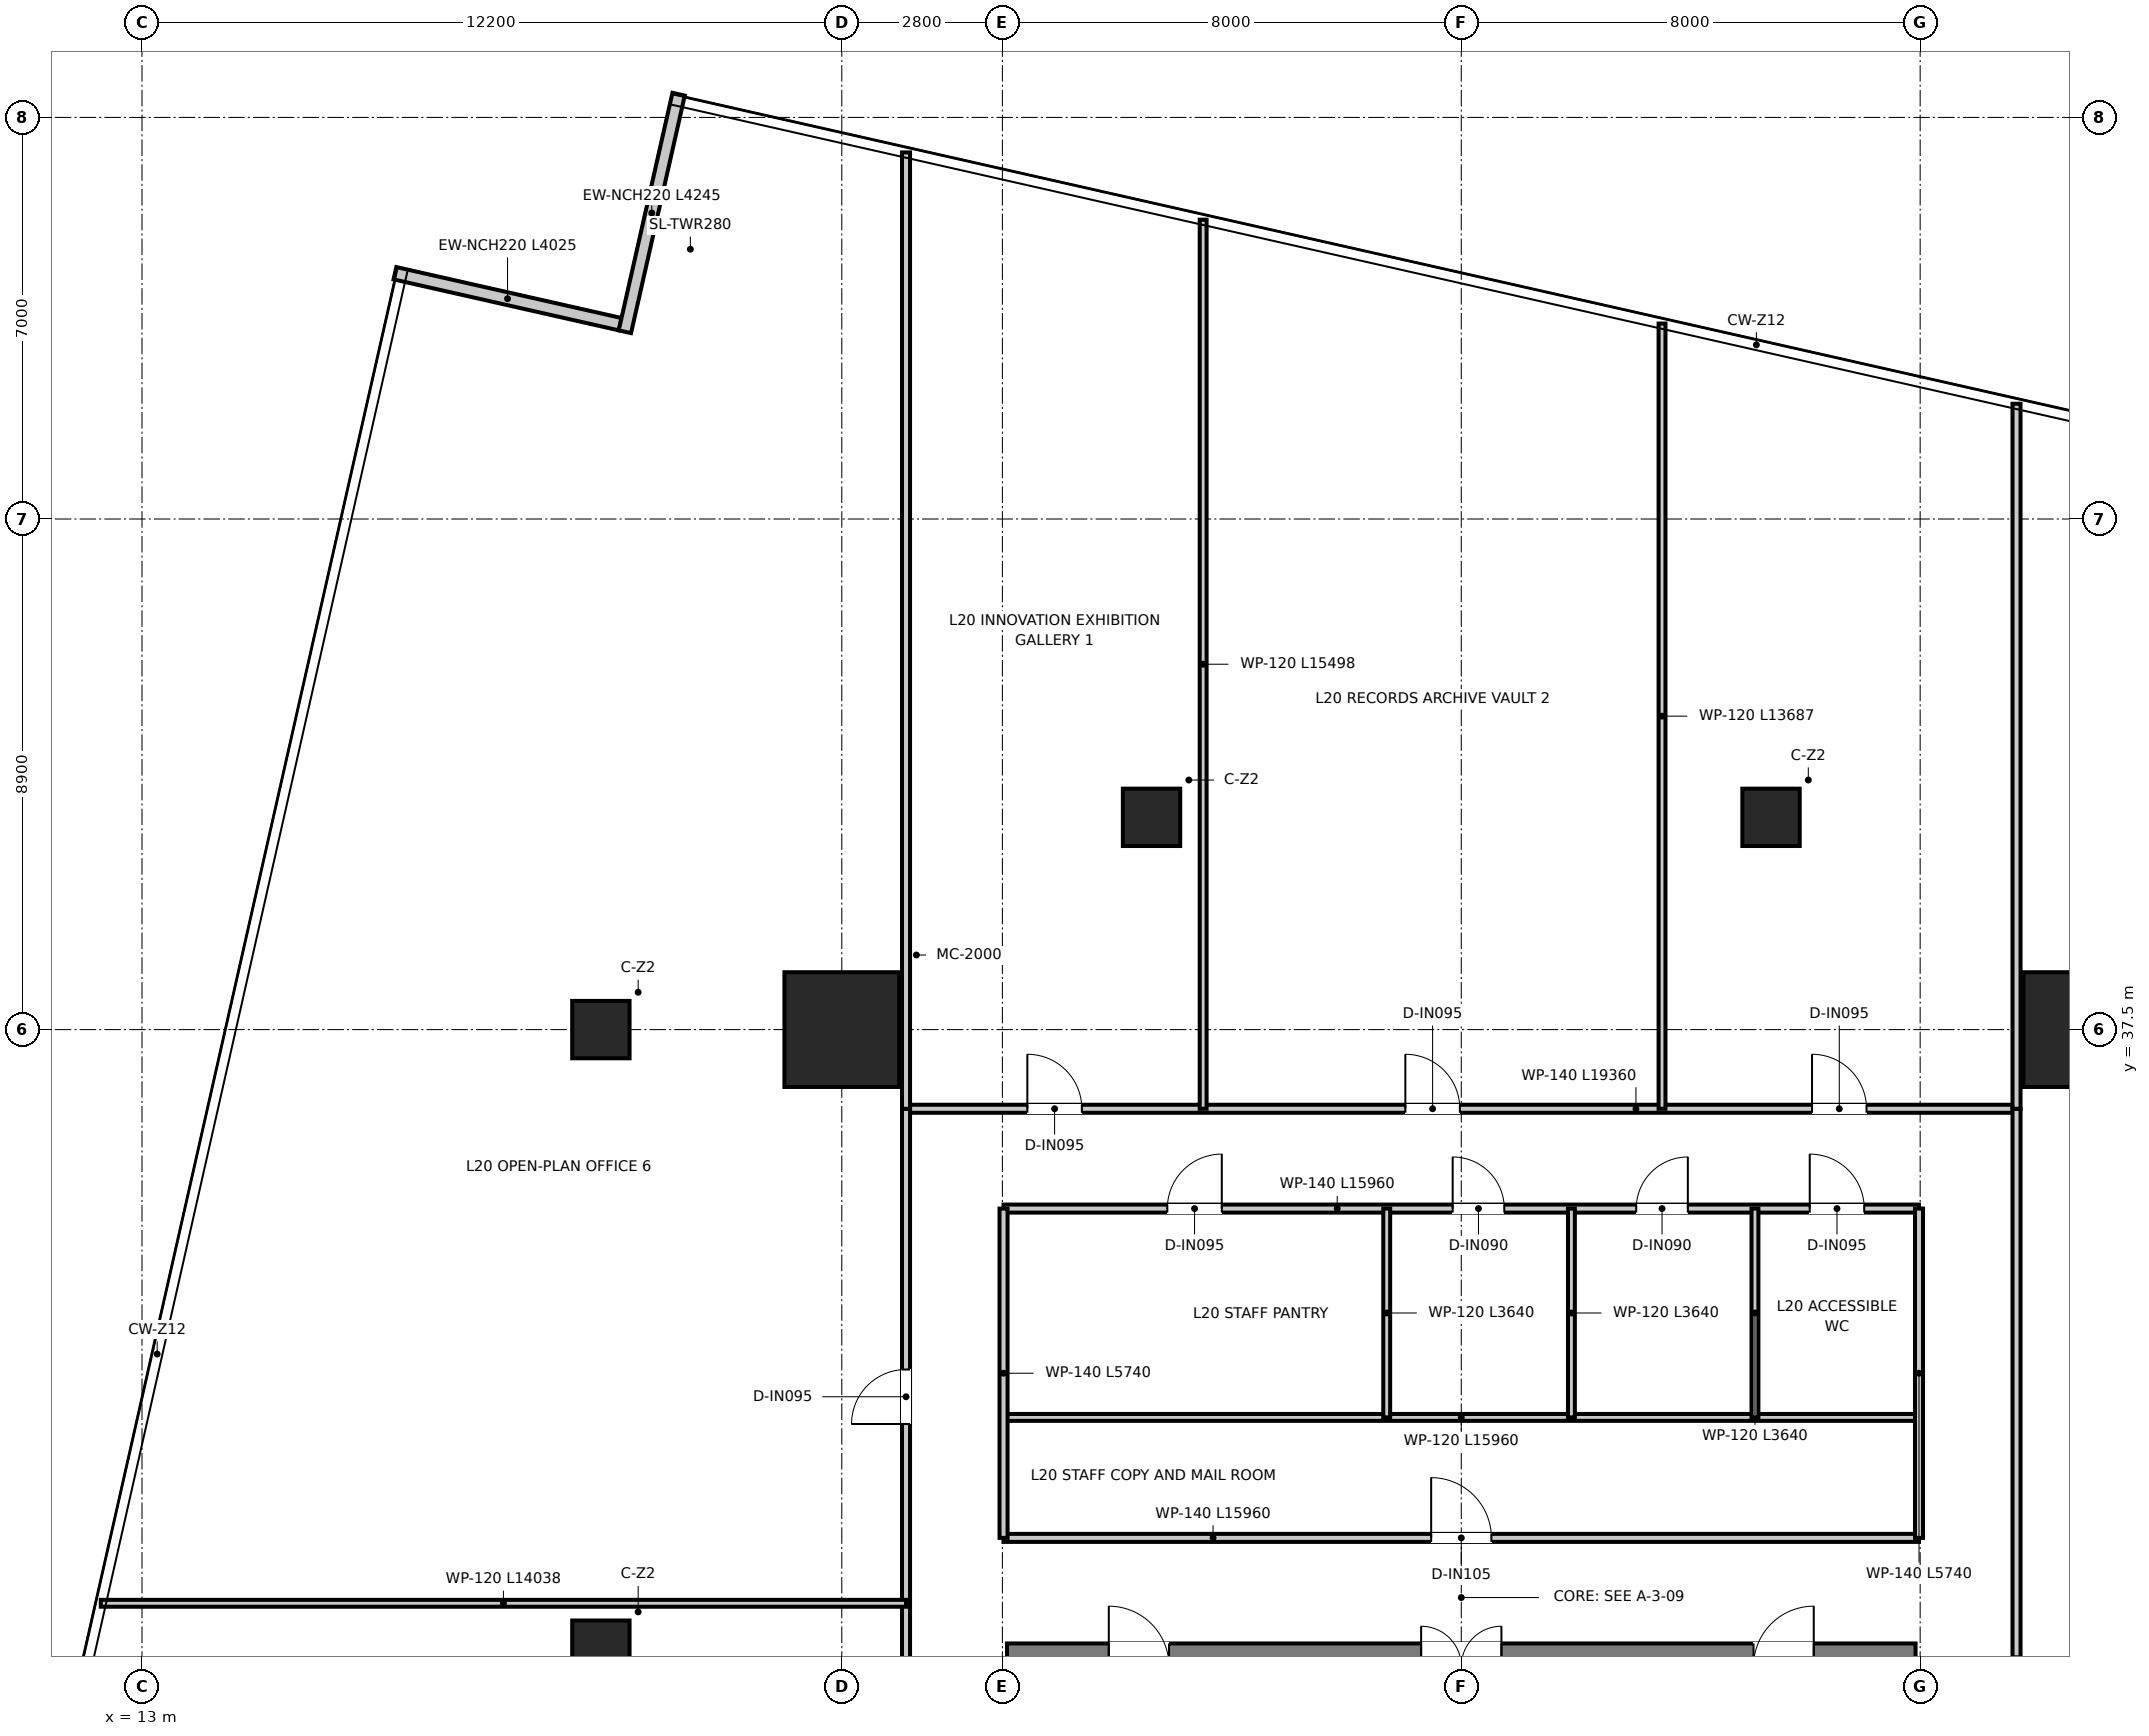
"""IFC4 building model, lengths in metres.
Left out: names, types, materials, properties, quantities, classifications, styles, units other than length and angle.
Written with IfcOpenShell. Run it as: python <this file> out.ifc"""

import sys

from ifc_helpers import new_model, si_unit, direction, frame, frame_2d, origin, origin_2d, place, context, subcontext, project, spatial, rectangle, extrude, source, transform, mapped, element, fill, save


model = new_model("IFC4")
c1 = context("Model", 3, precision=1e-05, world=origin(), true_north=direction((0.0, 1.0)))
c2 = subcontext(c1, "Body", "Model", "MODEL_VIEW")
j1 = project(units=[si_unit("LENGTHUNIT", "METRE"), si_unit("PLANEANGLEUNIT", "RADIAN")], contexts=[c1])
p1 = place(None, origin())
s1 = spatial("IfcSite", under=j1, at=p1, CompositionType="ELEMENT")
p2 = place(p1, origin())
s2 = spatial("IfcBuilding", under=s1, at=p2, CompositionType="ELEMENT")
p3 = place(p2, frame((0.0, 0.0, 86.1)))
s3 = spatial("IfcBuildingStorey", under=s2, at=p3, CompositionType="ELEMENT", Elevation=86.1)
p4 = place(p3, frame((28.08, 26.4, 0.0), z_axis=(0.0, 0.0, 1.0), x_axis=(1.0, 0.0, 0.0)))
e1 = element("IfcWall", 1, at=p4, inside=s3, PredefinedType="SHEAR", context=c2, shape_type="SweptSolid", body=[
    extrude(rectangle(XDim=15.84, YDim=0.8, at=frame_2d((7.92, 0.0))), origin(), (0.0, 0.0, 1.0), 3.95),
])
p5 = place(p4, frame((7.22, 0.0, 0.0)))
e2 = element("IfcOpeningElement", 2, at=p5, cuts=e1, PredefinedType="OPENING", context=c2, shape_type="SweptSolid", body=[
    extrude(rectangle(XDim=1.4, YDim=2.2, at=frame_2d((0.7, 1.1))), frame((0.0, 0.41, 0.0), z_axis=(0.0, -1.0, 0.0), x_axis=(1.0, 0.0, 0.0)), (0.0, 0.0, 1.0), 0.82),
])
p6 = place(p4, frame((1.775, 0.0, 0.0)))
e3 = element("IfcOpeningElement", 3, at=p6, cuts=e1, PredefinedType="OPENING", context=c2, shape_type="SweptSolid", body=[
    extrude(rectangle(XDim=1.05, YDim=2.1, at=frame_2d((0.525, 1.05))), frame((0.0, 0.41, 0.0), z_axis=(0.0, -1.0, 0.0), x_axis=(1.0, 0.0, 0.0)), (0.0, 0.0, 1.0), 0.82),
])
p7 = place(p4, frame((13.015, 0.0, 0.0)))
e4 = element("IfcOpeningElement", 4, at=p7, cuts=e1, PredefinedType="OPENING", context=c2, shape_type="SweptSolid", body=[
    extrude(rectangle(XDim=1.05, YDim=2.1, at=frame_2d((0.525, 1.05))), frame((0.0, 0.41, 0.0), z_axis=(0.0, -1.0, 0.0), x_axis=(1.0, 0.0, 0.0)), (0.0, 0.0, 1.0), 0.82),
])
m1 = source(origin(), c2, "Body", "SweptSolid", [
    extrude(rectangle(XDim=2.0, YDim=2.0, at=origin_2d()), origin(), (0.0, 0.0, 1.0), 3.95),
])
for number, where, z_axis, x_axis in (
    (5, (46.8, 37.5, 0.0), (0.0, 0.0, 1.0), (1.0, 0.0, 0.0)),
    (6, (25.2, 37.5, 0.0), (0.0, 0.0, 1.0), (1.0, 0.0, 0.0)),
):
    element("IfcColumn", number, at=place(p3, frame(where, z_axis=z_axis, x_axis=x_axis)), inside=s3, PredefinedType="USERDEFINED", context=c2, shape_type="MappedRepresentation", body=[
        mapped(m1, transform((0.0, 0.0, 0.0), x_axis=(1.0, 0.0, 0.0), y_axis=(0.0, 1.0, 0.0), z_axis=(0.0, 0.0, 1.0), scale=1.0)),
    ])
m2 = source(origin(), c2, "Body", "SweptSolid", [
    extrude(rectangle(XDim=1.0, YDim=1.0, at=origin_2d()), origin(), (0.0, 0.0, 1.0), 3.95),
])
for number, where, z_axis, x_axis in (
    (7, (21.0, 26.7, 0.0), (0.0, 0.0, 1.0), (1.0, 0.0, 0.0)),
    (8, (21.0, 37.5, 0.0), (0.0, 0.0, 1.0), (1.0, 0.0, 0.0)),
    (9, (30.6, 41.2, 0.0), (0.0, 0.0, 1.0), (1.0, 0.0, 0.0)),
    (10, (41.4, 41.2, 0.0), (0.0, 0.0, 1.0), (1.0, 0.0, 0.0)),
):
    element("IfcColumn", number, at=place(p3, frame(where, z_axis=z_axis, x_axis=x_axis)), inside=s3, PredefinedType="COLUMN", context=c2, shape_type="MappedRepresentation", body=[
        mapped(m2, transform((0.0, 0.0, 0.0), x_axis=(1.0, 0.0, 0.0), y_axis=(0.0, 1.0, 0.0), z_axis=(0.0, 0.0, 1.0), scale=1.0)),
    ])
p8 = place(p3, frame((21.336, 49.796, 0.0), z_axis=(0.0, 0.0, 1.0), x_axis=(-0.975349272951, 0.2206667074, 0.0)))
e11 = element("IfcWall", 11, at=p8, inside=s3, PredefinedType="ELEMENTEDWALL", context=c2, shape_type="SweptSolid", body=[
    extrude(rectangle(XDim=4.025, YDim=0.22, at=frame_2d((2.012, 0.0))), origin(), (0.0, 0.0, 1.0), 3.67),
])
p9 = place(p3, frame((22.355, 53.805, 0.0), z_axis=(0.0, 0.0, 1.0), x_axis=(-0.220673913812, -0.975347642517, 0.0)))
e12 = element("IfcWall", 12, at=p9, inside=s3, PredefinedType="ELEMENTEDWALL", context=c2, shape_type="SweptSolid", body=[
    extrude(rectangle(XDim=4.245, YDim=0.22, at=frame_2d((2.123, 0.0))), origin(), (0.0, 0.0, 1.0), 3.67),
])
p10 = place(p3, frame((28.02, 28.64, 0.0), z_axis=(0.0, 0.0, 1.0), x_axis=(1.0, 0.0, 0.0)))
e13 = element("IfcWall", 13, at=p10, inside=s3, PredefinedType="PARTITIONING", context=c2, shape_type="SweptSolid", body=[
    extrude(rectangle(XDim=15.96, YDim=0.14, at=frame_2d((7.98, 0.0))), origin(), (0.0, 0.0, 1.0), 3.08),
])
p11 = place(p10, frame((7.455, 0.0, 0.0)))
e14 = element("IfcOpeningElement", 14, at=p11, cuts=e13, PredefinedType="OPENING", context=c2, shape_type="SweptSolid", body=[
    extrude(rectangle(XDim=1.05, YDim=2.15, at=frame_2d((0.525, 1.075))), frame((0.0, 0.08, 0.0), z_axis=(0.0, -1.0, 0.0), x_axis=(1.0, 0.0, 0.0)), (0.0, 0.0, 1.0), 0.16),
])
p12 = place(p3, frame((28.02, 30.74, 0.0), z_axis=(0.0, 0.0, 1.0), x_axis=(1.0, 0.0, 0.0)))
e15 = element("IfcWall", 15, at=p12, inside=s3, PredefinedType="PARTITIONING", context=c2, shape_type="SweptSolid", body=[
    extrude(rectangle(XDim=15.96, YDim=0.12, at=frame_2d((7.98, 0.0))), origin(), (0.0, 0.0, 1.0), 3.08),
])
p13 = place(p3, frame((28.02, 34.38, 0.0), z_axis=(0.0, 0.0, 1.0), x_axis=(1.0, 0.0, 0.0)))
e16 = element("IfcWall", 16, at=p13, inside=s3, PredefinedType="PARTITIONING", context=c2, shape_type="SweptSolid", body=[
    extrude(rectangle(XDim=15.96, YDim=0.14, at=frame_2d((7.98, 0.0))), origin(), (0.0, 0.0, 1.0), 3.08),
])
p14 = place(p13, frame((7.83, 0.0, 0.0)))
e17 = element("IfcOpeningElement", 17, at=p14, cuts=e16, PredefinedType="OPENING", context=c2, shape_type="SweptSolid", body=[
    extrude(rectangle(XDim=0.9, YDim=2.1, at=frame_2d((0.45, 1.05))), frame((0.0, 0.08, 0.0), z_axis=(0.0, -1.0, 0.0), x_axis=(1.0, 0.0, 0.0)), (0.0, 0.0, 1.0), 0.16),
])
p15 = place(p13, frame((11.03, 0.0, 0.0)))
e18 = element("IfcOpeningElement", 18, at=p15, cuts=e16, PredefinedType="OPENING", context=c2, shape_type="SweptSolid", body=[
    extrude(rectangle(XDim=0.9, YDim=2.1, at=frame_2d((0.45, 1.05))), frame((0.0, 0.08, 0.0), z_axis=(0.0, -1.0, 0.0), x_axis=(1.0, 0.0, 0.0)), (0.0, 0.0, 1.0), 0.16),
])
p16 = place(p13, frame((14.055, 0.0, 0.0)))
e19 = element("IfcOpeningElement", 19, at=p16, cuts=e16, PredefinedType="OPENING", context=c2, shape_type="SweptSolid", body=[
    extrude(rectangle(XDim=0.95, YDim=2.1, at=frame_2d((0.475, 1.05))), frame((0.0, 0.08, 0.0), z_axis=(0.0, -1.0, 0.0), x_axis=(1.0, 0.0, 0.0)), (0.0, 0.0, 1.0), 0.16),
])
p17 = place(p13, frame((2.855, 0.0, 0.0)))
e20 = element("IfcOpeningElement", 20, at=p17, cuts=e16, PredefinedType="OPENING", context=c2, shape_type="SweptSolid", body=[
    extrude(rectangle(XDim=0.95, YDim=2.1, at=frame_2d((0.475, 1.05))), frame((0.0, 0.08, 0.0), z_axis=(0.0, -1.0, 0.0), x_axis=(1.0, 0.0, 0.0)), (0.0, 0.0, 1.0), 0.16),
])
for number, where, z_axis, x_axis in (
    (21, (28.02, 28.64, 0.0), (0.0, 0.0, 1.0), (0.0, 1.0, 0.0)),
    (22, (43.98, 28.64, 0.0), (0.0, 0.0, 1.0), (0.0, 1.0, 0.0)),
):
    element("IfcWall", number, at=place(p3, frame(where, z_axis=z_axis, x_axis=x_axis)), inside=s3, PredefinedType="PARTITIONING", context=c2, shape_type="SweptSolid", body=[
        extrude(rectangle(XDim=5.74, YDim=0.14, at=frame_2d((2.87, 0.0))), origin(), (0.0, 0.0, 1.0), 3.27),
    ])
for number, where, z_axis, x_axis in (
    (23, (37.92, 30.74, 0.0), (0.0, 0.0, 1.0), (0.0, 1.0, 0.0)),
    (24, (41.12, 30.74, 0.0), (0.0, 0.0, 1.0), (0.0, 1.0, 0.0)),
    (25, (34.7, 30.74, 0.0), (0.0, 0.0, 1.0), (0.0, 1.0, 0.0)),
):
    element("IfcWall", number, at=place(p3, frame(where, z_axis=z_axis, x_axis=x_axis)), inside=s3, PredefinedType="PARTITIONING", context=c2, shape_type="SweptSolid", body=[
        extrude(rectangle(XDim=3.64, YDim=0.12, at=frame_2d((1.82, 0.0))), origin(), (0.0, 0.0, 1.0), 3.17),
    ])
p18 = place(p3, frame((26.32, 36.12, 0.0), z_axis=(0.0, 0.0, 1.0), x_axis=(1.0, 0.0, 0.0)))
e26 = element("IfcWall", 26, at=p18, inside=s3, PredefinedType="PARTITIONING", context=c2, shape_type="SweptSolid", body=[
    extrude(rectangle(XDim=19.36, YDim=0.14, at=frame_2d((9.68, 0.0))), origin(), (0.0, 0.0, 1.0), 3.08),
])
p19 = place(p18, frame((2.115, 0.0, 0.0)))
e27 = element("IfcOpeningElement", 27, at=p19, cuts=e26, PredefinedType="OPENING", context=c2, shape_type="SweptSolid", body=[
    extrude(rectangle(XDim=0.95, YDim=2.1, at=frame_2d((0.475, 1.05))), frame((0.0, 0.08, 0.0), z_axis=(0.0, -1.0, 0.0), x_axis=(1.0, 0.0, 0.0)), (0.0, 0.0, 1.0), 0.16),
])
p20 = place(p18, frame((8.705, 0.0, 0.0)))
e28 = element("IfcOpeningElement", 28, at=p20, cuts=e26, PredefinedType="OPENING", context=c2, shape_type="SweptSolid", body=[
    extrude(rectangle(XDim=0.95, YDim=2.1, at=frame_2d((0.475, 1.05))), frame((0.0, 0.08, 0.0), z_axis=(0.0, -1.0, 0.0), x_axis=(1.0, 0.0, 0.0)), (0.0, 0.0, 1.0), 0.16),
])
p21 = place(p18, frame((15.795, 0.0, 0.0)))
e29 = element("IfcOpeningElement", 29, at=p21, cuts=e26, PredefinedType="OPENING", context=c2, shape_type="SweptSolid", body=[
    extrude(rectangle(XDim=0.95, YDim=2.1, at=frame_2d((0.475, 1.05))), frame((0.0, 0.08, 0.0), z_axis=(0.0, -1.0, 0.0), x_axis=(1.0, 0.0, 0.0)), (0.0, 0.0, 1.0), 0.16),
])
p22 = place(p3, frame((26.32, 10.5, 0.0), z_axis=(0.0, 0.0, 1.0), x_axis=(0.0, 1.0, 0.0)))
e30 = element("IfcWall", 30, at=p22, inside=s3, PredefinedType="PARTITIONING", context=c2, shape_type="SweptSolid", body=[
    extrude(rectangle(XDim=25.62, YDim=0.14, at=frame_2d((12.81, 0.0))), origin(), (0.0, 0.0, 1.0), 2.97),
])
p23 = place(p22, frame((8.025, 0.0, 0.0)))
e31 = element("IfcOpeningElement", 31, at=p23, cuts=e30, PredefinedType="OPENING", context=c2, shape_type="SweptSolid", body=[
    extrude(rectangle(XDim=0.95, YDim=2.1, at=frame_2d((0.475, 1.05))), frame((0.0, 0.08, 0.0), z_axis=(0.0, -1.0, 0.0), x_axis=(1.0, 0.0, 0.0)), (0.0, 0.0, 1.0), 0.16),
])
p24 = place(p22, frame((13.025, 0.0, 0.0)))
e32 = element("IfcOpeningElement", 32, at=p24, cuts=e30, PredefinedType="OPENING", context=c2, shape_type="SweptSolid", body=[
    extrude(rectangle(XDim=0.95, YDim=2.1, at=frame_2d((0.475, 1.05))), frame((0.0, 0.08, 0.0), z_axis=(0.0, -1.0, 0.0), x_axis=(1.0, 0.0, 0.0)), (0.0, 0.0, 1.0), 0.16),
])
p25 = place(p22, frame((20.125, 0.0, 0.0)))
e33 = element("IfcOpeningElement", 33, at=p25, cuts=e30, PredefinedType="OPENING", context=c2, shape_type="SweptSolid", body=[
    extrude(rectangle(XDim=0.95, YDim=2.1, at=frame_2d((0.475, 1.05))), frame((0.0, 0.08, 0.0), z_axis=(0.0, -1.0, 0.0), x_axis=(1.0, 0.0, 0.0)), (0.0, 0.0, 1.0), 0.16),
])
p26 = place(p3, frame((45.68, 10.5, 0.0), z_axis=(0.0, 0.0, 1.0), x_axis=(0.0, 1.0, 0.0)))
e34 = element("IfcWall", 34, at=p26, inside=s3, PredefinedType="PARTITIONING", context=c2, shape_type="SweptSolid", body=[
    extrude(rectangle(XDim=25.62, YDim=0.14, at=frame_2d((12.81, 0.0))), origin(), (0.0, 0.0, 1.0), 2.97),
])
p27 = place(p26, frame((15.125, 0.0, 0.0)))
e35 = element("IfcOpeningElement", 35, at=p27, cuts=e34, PredefinedType="OPENING", context=c2, shape_type="SweptSolid", body=[
    extrude(rectangle(XDim=0.95, YDim=2.1, at=frame_2d((0.475, 1.05))), frame((0.0, 0.08, 0.0), z_axis=(0.0, -1.0, 0.0), x_axis=(1.0, 0.0, 0.0)), (0.0, 0.0, 1.0), 0.16),
])
p28 = place(p3, frame((26.32, 36.12, 0.0), z_axis=(0.0, 0.0, 1.0), x_axis=(0.0, 1.0, 0.0)))
e36 = element("IfcWall", 36, at=p28, inside=s3, PredefinedType="PARTITIONING", context=c2, shape_type="SweptSolid", body=[
    extrude(rectangle(XDim=16.67, YDim=0.14, at=frame_2d((8.335, 0.0))), origin(), (0.0, 0.0, 1.0), 2.97),
])
p29 = place(p3, frame((45.68, 36.12, 0.0), z_axis=(0.0, 0.0, 1.0), x_axis=(0.0, 1.0, 0.0)))
e37 = element("IfcWall", 37, at=p29, inside=s3, PredefinedType="PARTITIONING", context=c2, shape_type="SweptSolid", body=[
    extrude(rectangle(XDim=12.289, YDim=0.14, at=frame_2d((6.145, 0.0))), origin(), (0.0, 0.0, 1.0), 2.97),
])
p30 = place(p3, frame((31.5, 36.12, 0.0), z_axis=(0.0, 0.0, 1.0), x_axis=(0.0, 1.0, 0.0)))
e38 = element("IfcWall", 38, at=p30, inside=s3, PredefinedType="PARTITIONING", context=c2, shape_type="SweptSolid", body=[
    extrude(rectangle(XDim=15.497, YDim=0.12, at=frame_2d((7.749, 0.0))), origin(), (0.0, 0.0, 1.0), 2.97),
])
p31 = place(p3, frame((39.5, 36.12, 0.0), z_axis=(0.0, 0.0, 1.0), x_axis=(0.0, 1.0, 0.0)))
e39 = element("IfcWall", 39, at=p31, inside=s3, PredefinedType="PARTITIONING", context=c2, shape_type="SweptSolid", body=[
    extrude(rectangle(XDim=13.687, YDim=0.12, at=frame_2d((6.844, 0.0))), origin(), (0.0, 0.0, 1.0), 2.97),
])
p32 = place(p3, frame((12.282, 27.5, 0.0), z_axis=(0.0, 0.0, 1.0), x_axis=(1.0, 0.0, 0.0)))
e40 = element("IfcWall", 40, at=p32, inside=s3, PredefinedType="PARTITIONING", context=c2, shape_type="SweptSolid", body=[
    extrude(rectangle(XDim=14.038, YDim=0.12, at=frame_2d((7.019, 0.0))), origin(), (0.0, 0.0, 1.0), 2.97),
])
p33 = place(p11, origin())
e41 = element("IfcDoor", 41, at=p33, inside=s3, OperationType="SINGLE_SWING_LEFT", PredefinedType="DOOR", context=c2, shape_type="SweptSolid", body=[
    extrude(rectangle(XDim=1.05, YDim=2.15, at=frame_2d((0.525, 1.075))), frame((0.0, 0.025, 0.0), z_axis=(0.0, -1.0, 0.0), x_axis=(1.0, 0.0, 0.0)), (0.0, 0.0, 1.0), 0.05),
])
fill(e14, e41)
p34 = place(p14, origin())
e42 = element("IfcDoor", 42, at=p34, inside=s3, OperationType="SINGLE_SWING_LEFT", PredefinedType="DOOR", context=c2, shape_type="SweptSolid", body=[
    extrude(rectangle(XDim=0.9, YDim=2.1, at=frame_2d((0.45, 1.05))), frame((0.0, 0.025, 0.0), z_axis=(0.0, -1.0, 0.0), x_axis=(1.0, 0.0, 0.0)), (0.0, 0.0, 1.0), 0.05),
])
fill(e17, e42)
p35 = place(p15, origin())
e43 = element("IfcDoor", 43, at=p35, inside=s3, OperationType="SINGLE_SWING_RIGHT", PredefinedType="DOOR", context=c2, shape_type="SweptSolid", body=[
    extrude(rectangle(XDim=0.9, YDim=2.1, at=frame_2d((0.45, 1.05))), frame((0.0, 0.025, 0.0), z_axis=(0.0, -1.0, 0.0), x_axis=(1.0, 0.0, 0.0)), (0.0, 0.0, 1.0), 0.05),
])
fill(e18, e43)
p36 = place(p16, origin())
e44 = element("IfcDoor", 44, at=p36, inside=s3, OperationType="SINGLE_SWING_LEFT", PredefinedType="DOOR", context=c2, shape_type="SweptSolid", body=[
    extrude(rectangle(XDim=0.95, YDim=2.1, at=frame_2d((0.475, 1.05))), frame((0.0, 0.025, 0.0), z_axis=(0.0, -1.0, 0.0), x_axis=(1.0, 0.0, 0.0)), (0.0, 0.0, 1.0), 0.05),
])
fill(e19, e44)
p37 = place(p17, origin())
e45 = element("IfcDoor", 45, at=p37, inside=s3, OperationType="SINGLE_SWING_RIGHT", PredefinedType="DOOR", context=c2, shape_type="SweptSolid", body=[
    extrude(rectangle(XDim=0.95, YDim=2.1, at=frame_2d((0.475, 1.05))), frame((0.0, 0.025, 0.0), z_axis=(0.0, -1.0, 0.0), x_axis=(1.0, 0.0, 0.0)), (0.0, 0.0, 1.0), 0.05),
])
fill(e20, e45)
p38 = place(p19, origin())
e46 = element("IfcDoor", 46, at=p38, inside=s3, OperationType="SINGLE_SWING_LEFT", PredefinedType="DOOR", context=c2, shape_type="SweptSolid", body=[
    extrude(rectangle(XDim=0.95, YDim=2.1, at=frame_2d((0.475, 1.05))), frame((0.0, 0.025, 0.0), z_axis=(0.0, -1.0, 0.0), x_axis=(1.0, 0.0, 0.0)), (0.0, 0.0, 1.0), 0.05),
])
fill(e27, e46)
p39 = place(p20, origin())
e47 = element("IfcDoor", 47, at=p39, inside=s3, OperationType="SINGLE_SWING_LEFT", PredefinedType="DOOR", context=c2, shape_type="SweptSolid", body=[
    extrude(rectangle(XDim=0.95, YDim=2.1, at=frame_2d((0.475, 1.05))), frame((0.0, 0.025, 0.0), z_axis=(0.0, -1.0, 0.0), x_axis=(1.0, 0.0, 0.0)), (0.0, 0.0, 1.0), 0.05),
])
fill(e28, e47)
p40 = place(p21, origin())
e48 = element("IfcDoor", 48, at=p40, inside=s3, OperationType="SINGLE_SWING_LEFT", PredefinedType="DOOR", context=c2, shape_type="SweptSolid", body=[
    extrude(rectangle(XDim=0.95, YDim=2.1, at=frame_2d((0.475, 1.05))), frame((0.0, 0.025, 0.0), z_axis=(0.0, -1.0, 0.0), x_axis=(1.0, 0.0, 0.0)), (0.0, 0.0, 1.0), 0.05),
])
fill(e29, e48)
p41 = place(p25, origin())
e49 = element("IfcDoor", 49, at=p41, inside=s3, OperationType="SINGLE_SWING_LEFT", PredefinedType="DOOR", context=c2, shape_type="SweptSolid", body=[
    extrude(rectangle(XDim=0.95, YDim=2.1, at=frame_2d((0.475, 1.05))), frame((0.0, 0.025, 0.0), z_axis=(0.0, -1.0, 0.0), x_axis=(1.0, 0.0, 0.0)), (0.0, 0.0, 1.0), 0.05),
])
fill(e33, e49)
save(model, sys.argv[1])
